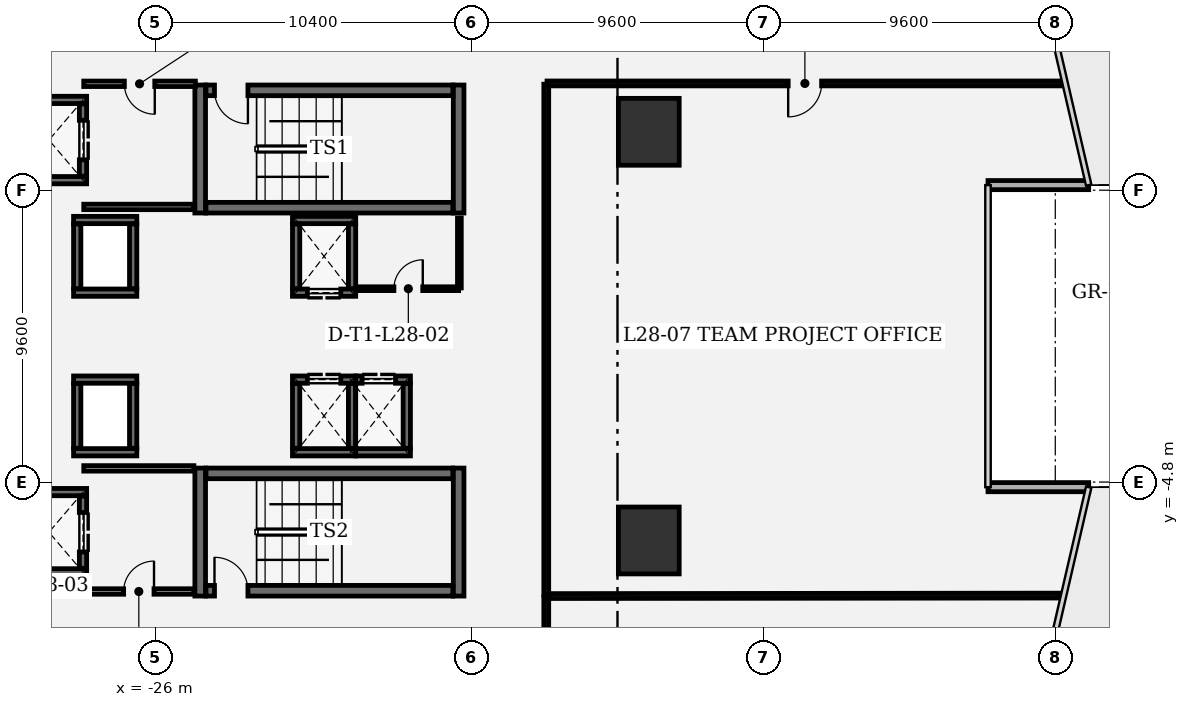
"""IFC4 building model, lengths in metres.
Left out: names, types, materials, properties, quantities, classifications, styles, units other than length and angle.
Written with IfcOpenShell. Run it as: python <this file> out.ifc"""

import sys

from ifc_helpers import new_model, si_unit, direction, frame, frame_2d, origin, origin_2d, place, context, subcontext, project, spatial, rectangle, extrude, element, fill, save


model = new_model("IFC4")
c1 = context("Model", 3, precision=1e-05, world=origin(), true_north=direction((0.0, 1.0)))
c2 = subcontext(c1, "Body", "Model", "MODEL_VIEW")
j1 = project(units=[si_unit("LENGTHUNIT", "METRE"), si_unit("PLANEANGLEUNIT", "RADIAN")], contexts=[c1])
p1 = place(None, origin())
s1 = spatial("IfcSite", under=j1, at=p1, CompositionType="ELEMENT")
p2 = place(p1, origin())
s2 = spatial("IfcBuilding", under=s1, at=p2, CompositionType="ELEMENT")
p3 = place(p2, frame((0.0, 0.0, 126.0)))
s3 = spatial("IfcBuildingStorey", under=s2, at=p3, CompositionType="ELEMENT", Elevation=126.0)
for number, where, z_axis, x_axis in (
    (1, (-9.77, -6.721, 0.0), (0.0, 0.0, 1.0), (1.0, 0.0, 0.0)),
    (2, (-9.77, 6.721, 0.0), (0.0, 0.0, 1.0), (1.0, 0.0, 0.0)),
):
    element("IfcColumn", number, at=place(p3, frame(where, z_axis=z_axis, x_axis=x_axis)), inside=s3, PredefinedType="COLUMN", context=c2, shape_type="SweptSolid", body=[
        extrude(rectangle(XDim=2.0, YDim=2.2, at=origin_2d()), origin(), (0.0, 0.0, 1.0), 4.05),
    ])
for number, where, z_axis, x_axis in (
    (3, (4.699, -4.968, 0.0), (0.0, 0.0, 1.0), (-1.0, 0.0, 0.0)),
    (4, (1.387, 4.968, 0.0), (0.0, 0.0, 1.0), (1.0, 0.0, 0.0)),
):
    element("IfcWall", number, at=place(p3, frame(where, z_axis=z_axis, x_axis=x_axis)), inside=s3, PredefinedType="SOLIDWALL", context=c2, shape_type="SweptSolid", body=[
        extrude(rectangle(XDim=3.312, YDim=0.3, at=frame_2d((1.656, 0.0))), origin(), (0.0, 0.0, 1.0), 3.77),
    ])
for number, where, z_axis, x_axis in (
    (5, (-24.525, 8.26, 0.0), (0.0, 0.0, 1.0), (0.0, -1.0, 0.0)),
    (6, (-16.025, 4.05, 0.0), (0.0, 0.0, 1.0), (0.0, 1.0, 0.0)),
):
    element("IfcWall", number, at=place(p3, frame(where, z_axis=z_axis, x_axis=x_axis)), inside=s3, PredefinedType="SHEAR", context=c2, shape_type="SweptSolid", body=[
        extrude(rectangle(XDim=4.21, YDim=0.35, at=frame_2d((2.105, 0.0))), origin(), (0.0, 0.0, 1.0), 3.77),
    ])
p4 = place(p3, frame((-24.335, 4.225, 0.0), z_axis=(0.0, 0.0, 1.0), x_axis=(1.0, 0.0, 0.0)))
e7 = element("IfcWall", 7, at=p4, inside=s3, PredefinedType="SHEAR", context=c2, shape_type="SweptSolid", body=[
    extrude(rectangle(XDim=8.12, YDim=0.35, at=frame_2d((4.06, 0.0))), origin(), (0.0, 0.0, 1.0), 3.77),
])
p5 = place(p3, frame((-16.215, 8.085, 0.0), z_axis=(0.0, 0.0, 1.0), x_axis=(-1.0, 0.0, 0.0)))
e8 = element("IfcWall", 8, at=p5, inside=s3, PredefinedType="SHEAR", context=c2, shape_type="SweptSolid", body=[
    extrude(rectangle(XDim=8.12, YDim=0.35, at=frame_2d((4.06, 0.0))), origin(), (0.0, 0.0, 1.0), 3.77),
])
p6 = place(p5, frame((6.74, 0.0, 0.0)))
e9 = element("IfcOpeningElement", 9, at=p6, cuts=e8, PredefinedType="OPENING", context=c2, shape_type="SweptSolid", body=[
    extrude(rectangle(XDim=1.1, YDim=2.2, at=frame_2d((0.55, 1.1))), frame((0.0, 0.185, 0.0), z_axis=(0.0, -1.0, 0.0), x_axis=(1.0, 0.0, 0.0)), (0.0, 0.0, 1.0), 0.37),
])
for number, where, z_axis, x_axis in (
    (10, (-24.525, -4.34, 0.0), (0.0, 0.0, 1.0), (0.0, -1.0, 0.0)),
    (11, (-16.025, -8.55, 0.0), (0.0, 0.0, 1.0), (0.0, 1.0, 0.0)),
):
    element("IfcWall", number, at=place(p3, frame(where, z_axis=z_axis, x_axis=x_axis)), inside=s3, PredefinedType="SHEAR", context=c2, shape_type="SweptSolid", body=[
        extrude(rectangle(XDim=4.21, YDim=0.35, at=frame_2d((2.105, 0.0))), origin(), (0.0, 0.0, 1.0), 3.77),
    ])
p7 = place(p3, frame((-24.335, -8.375, 0.0), z_axis=(0.0, 0.0, 1.0), x_axis=(1.0, 0.0, 0.0)))
e12 = element("IfcWall", 12, at=p7, inside=s3, PredefinedType="SHEAR", context=c2, shape_type="SweptSolid", body=[
    extrude(rectangle(XDim=8.12, YDim=0.35, at=frame_2d((4.06, 0.0))), origin(), (0.0, 0.0, 1.0), 3.77),
])
p8 = place(p7, frame((0.28, 0.0, 0.0)))
e13 = element("IfcOpeningElement", 13, at=p8, cuts=e12, PredefinedType="OPENING", context=c2, shape_type="SweptSolid", body=[
    extrude(rectangle(XDim=1.1, YDim=2.2, at=frame_2d((0.55, 1.1))), frame((0.0, 0.185, 0.0), z_axis=(0.0, -1.0, 0.0), x_axis=(1.0, 0.0, 0.0)), (0.0, 0.0, 1.0), 0.37),
])
p9 = place(p3, frame((-16.215, -4.515, 0.0), z_axis=(0.0, 0.0, 1.0), x_axis=(-1.0, 0.0, 0.0)))
e14 = element("IfcWall", 14, at=p9, inside=s3, PredefinedType="SHEAR", context=c2, shape_type="SweptSolid", body=[
    extrude(rectangle(XDim=8.12, YDim=0.35, at=frame_2d((4.06, 0.0))), origin(), (0.0, 0.0, 1.0), 3.77),
])
for number, where, z_axis, x_axis in (
    (15, (-28.26, 5.13, 0.0), (0.0, 0.0, 1.0), (-1.0, 0.0, 0.0)),
    (16, (-30.74, 7.77, 0.0), (0.0, 0.0, 1.0), (1.0, 0.0, 0.0)),
):
    element("IfcWall", number, at=place(p3, frame(where, z_axis=z_axis, x_axis=x_axis)), inside=s3, PredefinedType="SHEAR", context=c2, shape_type="SweptSolid", body=[
        extrude(rectangle(XDim=2.48, YDim=0.24, at=frame_2d((1.24, 0.0))), origin(), (0.0, 0.0, 1.0), 3.77),
    ])
p10 = place(p3, frame((-28.38, 7.638, 0.0), z_axis=(0.0, 0.0, 1.0), x_axis=(0.0, -1.0, 0.0)))
e17 = element("IfcWall", 17, at=p10, inside=s3, PredefinedType="SHEAR", context=c2, shape_type="SweptSolid", body=[
    extrude(rectangle(XDim=2.376, YDim=0.24, at=frame_2d((1.188, 0.0))), origin(), (0.0, 0.0, 1.0), 3.77),
])
p11 = place(p10, frame((0.538, 0.0, 0.0)))
e18 = element("IfcOpeningElement", 18, at=p11, cuts=e17, PredefinedType="OPENING", context=c2, shape_type="SweptSolid", body=[
    extrude(rectangle(XDim=1.3, YDim=2.3, at=frame_2d((0.65, 1.15))), frame((0.0, 0.13, 0.0), z_axis=(0.0, -1.0, 0.0), x_axis=(1.0, 0.0, 0.0)), (0.0, 0.0, 1.0), 0.26),
])
for number, where, z_axis, x_axis in (
    (19, (-28.26, -7.77, 0.0), (0.0, 0.0, 1.0), (-1.0, 0.0, 0.0)),
    (20, (-30.74, -5.13, 0.0), (0.0, 0.0, 1.0), (1.0, 0.0, 0.0)),
):
    element("IfcWall", number, at=place(p3, frame(where, z_axis=z_axis, x_axis=x_axis)), inside=s3, PredefinedType="SHEAR", context=c2, shape_type="SweptSolid", body=[
        extrude(rectangle(XDim=2.48, YDim=0.24, at=frame_2d((1.24, 0.0))), origin(), (0.0, 0.0, 1.0), 3.77),
    ])
p12 = place(p3, frame((-28.38, -5.262, 0.0), z_axis=(0.0, 0.0, 1.0), x_axis=(0.0, -1.0, 0.0)))
e21 = element("IfcWall", 21, at=p12, inside=s3, PredefinedType="SHEAR", context=c2, shape_type="SweptSolid", body=[
    extrude(rectangle(XDim=2.376, YDim=0.24, at=frame_2d((1.188, 0.0))), origin(), (0.0, 0.0, 1.0), 3.77),
])
p13 = place(p12, frame((0.538, 0.0, 0.0)))
e22 = element("IfcOpeningElement", 22, at=p13, cuts=e21, PredefinedType="OPENING", context=c2, shape_type="SweptSolid", body=[
    extrude(rectangle(XDim=1.3, YDim=2.3, at=frame_2d((0.65, 1.15))), frame((0.0, 0.13, 0.0), z_axis=(0.0, -1.0, 0.0), x_axis=(1.0, 0.0, 0.0)), (0.0, 0.0, 1.0), 0.26),
])
for number, where, z_axis, x_axis in (
    (23, (-26.61, 1.43, 0.0), (0.0, 0.0, 1.0), (-1.0, 0.0, 0.0)),
    (24, (-28.69, 3.82, 0.0), (0.0, 0.0, 1.0), (1.0, 0.0, 0.0)),
):
    element("IfcWall", number, at=place(p3, frame(where, z_axis=z_axis, x_axis=x_axis)), inside=s3, PredefinedType="SHEAR", context=c2, shape_type="SweptSolid", body=[
        extrude(rectangle(XDim=2.08, YDim=0.24, at=frame_2d((1.04, 0.0))), origin(), (0.0, 0.0, 1.0), 3.77),
    ])
for number, where, z_axis, x_axis in (
    (25, (-28.57, 1.562, 0.0), (0.0, 0.0, 1.0), (0.0, 1.0, 0.0)),
    (26, (-26.73, 3.688, 0.0), (0.0, 0.0, 1.0), (0.0, -1.0, 0.0)),
):
    element("IfcWall", number, at=place(p3, frame(where, z_axis=z_axis, x_axis=x_axis)), inside=s3, PredefinedType="SHEAR", context=c2, shape_type="SweptSolid", body=[
        extrude(rectangle(XDim=2.126, YDim=0.24, at=frame_2d((1.063, 0.0))), origin(), (0.0, 0.0, 1.0), 3.77),
    ])
p14 = place(p3, frame((-19.41, 1.43, 0.0), z_axis=(0.0, 0.0, 1.0), x_axis=(-1.0, 0.0, 0.0)))
e27 = element("IfcWall", 27, at=p14, inside=s3, PredefinedType="SHEAR", context=c2, shape_type="SweptSolid", body=[
    extrude(rectangle(XDim=2.08, YDim=0.24, at=frame_2d((1.04, 0.0))), origin(), (0.0, 0.0, 1.0), 3.77),
])
p15 = place(p14, frame((0.49, 0.0, 0.0)))
e28 = element("IfcOpeningElement", 28, at=p15, cuts=e27, PredefinedType="OPENING", context=c2, shape_type="SweptSolid", body=[
    extrude(rectangle(XDim=1.1, YDim=2.2, at=frame_2d((0.55, 1.1))), frame((0.0, 0.13, 0.0), z_axis=(0.0, -1.0, 0.0), x_axis=(1.0, 0.0, 0.0)), (0.0, 0.0, 1.0), 0.26),
])
p16 = place(p3, frame((-21.49, 3.82, 0.0), z_axis=(0.0, 0.0, 1.0), x_axis=(1.0, 0.0, 0.0)))
e29 = element("IfcWall", 29, at=p16, inside=s3, PredefinedType="SHEAR", context=c2, shape_type="SweptSolid", body=[
    extrude(rectangle(XDim=2.08, YDim=0.24, at=frame_2d((1.04, 0.0))), origin(), (0.0, 0.0, 1.0), 3.77),
])
for number, where, z_axis, x_axis in (
    (30, (-21.37, 1.562, 0.0), (0.0, 0.0, 1.0), (0.0, 1.0, 0.0)),
    (31, (-19.53, 3.688, 0.0), (0.0, 0.0, 1.0), (0.0, -1.0, 0.0)),
):
    element("IfcWall", number, at=place(p3, frame(where, z_axis=z_axis, x_axis=x_axis)), inside=s3, PredefinedType="SHEAR", context=c2, shape_type="SweptSolid", body=[
        extrude(rectangle(XDim=2.126, YDim=0.24, at=frame_2d((1.063, 0.0))), origin(), (0.0, 0.0, 1.0), 3.77),
    ])
for number, where, z_axis, x_axis in (
    (32, (-26.61, -3.82, 0.0), (0.0, 0.0, 1.0), (-1.0, 0.0, 0.0)),
    (33, (-28.69, -1.43, 0.0), (0.0, 0.0, 1.0), (1.0, 0.0, 0.0)),
):
    element("IfcWall", number, at=place(p3, frame(where, z_axis=z_axis, x_axis=x_axis)), inside=s3, PredefinedType="SHEAR", context=c2, shape_type="SweptSolid", body=[
        extrude(rectangle(XDim=2.08, YDim=0.24, at=frame_2d((1.04, 0.0))), origin(), (0.0, 0.0, 1.0), 3.77),
    ])
for number, where, z_axis, x_axis in (
    (34, (-28.57, -3.688, 0.0), (0.0, 0.0, 1.0), (0.0, 1.0, 0.0)),
    (35, (-26.73, -1.562, 0.0), (0.0, 0.0, 1.0), (0.0, -1.0, 0.0)),
):
    element("IfcWall", number, at=place(p3, frame(where, z_axis=z_axis, x_axis=x_axis)), inside=s3, PredefinedType="SHEAR", context=c2, shape_type="SweptSolid", body=[
        extrude(rectangle(XDim=2.126, YDim=0.24, at=frame_2d((1.063, 0.0))), origin(), (0.0, 0.0, 1.0), 3.77),
    ])
p17 = place(p3, frame((-19.41, -3.82, 0.0), z_axis=(0.0, 0.0, 1.0), x_axis=(-1.0, 0.0, 0.0)))
e36 = element("IfcWall", 36, at=p17, inside=s3, PredefinedType="SHEAR", context=c2, shape_type="SweptSolid", body=[
    extrude(rectangle(XDim=2.08, YDim=0.24, at=frame_2d((1.04, 0.0))), origin(), (0.0, 0.0, 1.0), 3.77),
])
p18 = place(p3, frame((-21.49, -1.43, 0.0), z_axis=(0.0, 0.0, 1.0), x_axis=(1.0, 0.0, 0.0)))
e37 = element("IfcWall", 37, at=p18, inside=s3, PredefinedType="SHEAR", context=c2, shape_type="SweptSolid", body=[
    extrude(rectangle(XDim=2.08, YDim=0.24, at=frame_2d((1.04, 0.0))), origin(), (0.0, 0.0, 1.0), 3.77),
])
p19 = place(p18, frame((0.49, 0.0, 0.0)))
e38 = element("IfcOpeningElement", 38, at=p19, cuts=e37, PredefinedType="OPENING", context=c2, shape_type="SweptSolid", body=[
    extrude(rectangle(XDim=1.1, YDim=2.2, at=frame_2d((0.55, 1.1))), frame((0.0, 0.13, 0.0), z_axis=(0.0, -1.0, 0.0), x_axis=(1.0, 0.0, 0.0)), (0.0, 0.0, 1.0), 0.26),
])
for number, where, z_axis, x_axis in (
    (39, (-21.37, -3.688, 0.0), (0.0, 0.0, 1.0), (0.0, 1.0, 0.0)),
    (40, (-19.53, -1.562, 0.0), (0.0, 0.0, 1.0), (0.0, -1.0, 0.0)),
):
    element("IfcWall", number, at=place(p3, frame(where, z_axis=z_axis, x_axis=x_axis)), inside=s3, PredefinedType="SHEAR", context=c2, shape_type="SweptSolid", body=[
        extrude(rectangle(XDim=2.126, YDim=0.24, at=frame_2d((1.063, 0.0))), origin(), (0.0, 0.0, 1.0), 3.77),
    ])
p20 = place(p3, frame((-17.61, -3.82, 0.0), z_axis=(0.0, 0.0, 1.0), x_axis=(-1.0, 0.0, 0.0)))
e41 = element("IfcWall", 41, at=p20, inside=s3, PredefinedType="SHEAR", context=c2, shape_type="SweptSolid", body=[
    extrude(rectangle(XDim=1.8, YDim=0.24, at=frame_2d((0.9, 0.0))), origin(), (0.0, 0.0, 1.0), 3.77),
])
p21 = place(p3, frame((-19.41, -1.43, 0.0), z_axis=(0.0, 0.0, 1.0), x_axis=(1.0, 0.0, 0.0)))
e42 = element("IfcWall", 42, at=p21, inside=s3, PredefinedType="SHEAR", context=c2, shape_type="SweptSolid", body=[
    extrude(rectangle(XDim=1.8, YDim=0.24, at=frame_2d((0.9, 0.0))), origin(), (0.0, 0.0, 1.0), 3.77),
])
p22 = place(p21, frame((0.21, 0.0, 0.0)))
e43 = element("IfcOpeningElement", 43, at=p22, cuts=e42, PredefinedType="OPENING", context=c2, shape_type="SweptSolid", body=[
    extrude(rectangle(XDim=1.1, YDim=2.2, at=frame_2d((0.55, 1.1))), frame((0.0, 0.13, 0.0), z_axis=(0.0, -1.0, 0.0), x_axis=(1.0, 0.0, 0.0)), (0.0, 0.0, 1.0), 0.26),
])
p23 = place(p3, frame((-17.73, -1.562, 0.0), z_axis=(0.0, 0.0, 1.0), x_axis=(0.0, -1.0, 0.0)))
e44 = element("IfcWall", 44, at=p23, inside=s3, PredefinedType="SHEAR", context=c2, shape_type="SweptSolid", body=[
    extrude(rectangle(XDim=2.126, YDim=0.24, at=frame_2d((1.063, 0.0))), origin(), (0.0, 0.0, 1.0), 3.77),
])
p24 = place(p3, frame((-28.355, 4.25, 0.0), z_axis=(0.0, 0.0, 1.0), x_axis=(1.0, 0.0, 0.0)))
e45 = element("IfcWall", 45, at=p24, inside=s3, PredefinedType="PARTITIONING", context=c2, shape_type="SweptSolid", body=[
    extrude(rectangle(XDim=3.622, YDim=0.18, at=frame_2d((1.811, 0.0))), origin(), (0.0, 0.0, 1.0), 3.77),
])
p25 = place(p3, frame((-24.684, 8.3, 0.0), z_axis=(0.0, 0.0, 1.0), x_axis=(-1.0, 0.0, 0.0)))
e46 = element("IfcWall", 46, at=p25, inside=s3, PredefinedType="PARTITIONING", context=c2, shape_type="SweptSolid", body=[
    extrude(rectangle(XDim=3.671, YDim=0.18, at=frame_2d((1.835, 0.0))), origin(), (0.0, 0.0, 1.0), 3.77),
])
p26 = place(p25, frame((1.335, 0.0, 0.0)))
e47 = element("IfcOpeningElement", 47, at=p26, cuts=e46, PredefinedType="OPENING", context=c2, shape_type="SweptSolid", body=[
    extrude(rectangle(XDim=1.0, YDim=2.15, at=frame_2d((0.5, 1.075))), frame((0.0, 0.1, 0.0), z_axis=(0.0, -1.0, 0.0), x_axis=(1.0, 0.0, 0.0)), (0.0, 0.0, 1.0), 0.2),
])
p27 = place(p3, frame((-28.355, -8.4, 0.0), z_axis=(0.0, 0.0, 1.0), x_axis=(1.0, 0.0, 0.0)))
e48 = element("IfcWall", 48, at=p27, inside=s3, PredefinedType="PARTITIONING", context=c2, shape_type="SweptSolid", body=[
    extrude(rectangle(XDim=3.622, YDim=0.18, at=frame_2d((1.811, 0.0))), origin(), (0.0, 0.0, 1.0), 3.77),
])
p28 = place(p27, frame((1.311, 0.0, 0.0)))
e49 = element("IfcOpeningElement", 49, at=p28, cuts=e48, PredefinedType="OPENING", context=c2, shape_type="SweptSolid", body=[
    extrude(rectangle(XDim=1.0, YDim=2.15, at=frame_2d((0.5, 1.075))), frame((0.0, 0.1, 0.0), z_axis=(0.0, -1.0, 0.0), x_axis=(1.0, 0.0, 0.0)), (0.0, 0.0, 1.0), 0.2),
])
p29 = place(p3, frame((-24.733, -4.35, 0.0), z_axis=(0.0, 0.0, 1.0), x_axis=(-1.0, 0.0, 0.0)))
e50 = element("IfcWall", 50, at=p29, inside=s3, PredefinedType="PARTITIONING", context=c2, shape_type="SweptSolid", body=[
    extrude(rectangle(XDim=3.622, YDim=0.18, at=frame_2d((1.811, 0.0))), origin(), (0.0, 0.0, 1.0), 3.77),
])
p30 = place(p3, frame((-19.334, 1.56, 0.0), z_axis=(0.0, 0.0, 1.0), x_axis=(1.0, 0.0, 0.0)))
e51 = element("IfcWall", 51, at=p30, inside=s3, PredefinedType="PARTITIONING", context=c2, shape_type="SweptSolid", body=[
    extrude(rectangle(XDim=3.309, YDim=0.125, at=frame_2d((1.654, 0.0))), origin(), (0.0, 0.0, 1.0), 3.77),
])
p31 = place(p30, frame((1.179, 0.0, 0.0)))
e52 = element("IfcOpeningElement", 52, at=p31, cuts=e51, PredefinedType="OPENING", context=c2, shape_type="SweptSolid", body=[
    extrude(rectangle(XDim=0.95, YDim=2.15, at=frame_2d((0.475, 1.075))), frame((0.0, 0.073, 0.0), z_axis=(0.0, -1.0, 0.0), x_axis=(1.0, 0.0, 0.0)), (0.0, 0.0, 1.0), 0.145),
])
p32 = place(p3, frame((-16.0, 1.585, 0.0), z_axis=(0.0, 0.0, 1.0), x_axis=(0.0, 1.0, 0.0)))
e53 = element("IfcWall", 53, at=p32, inside=s3, PredefinedType="PARTITIONING", context=c2, shape_type="SweptSolid", body=[
    extrude(rectangle(XDim=2.302, YDim=0.125, at=frame_2d((1.151, 0.0))), origin(), (0.0, 0.0, 1.0), 3.77),
])
p33 = place(p3, frame((3.794, -8.534, 0.0), z_axis=(0.0, 0.0, 1.0), x_axis=(-0.999999573173, -0.000923933833, 0.0)))
e54 = element("IfcWall", 54, at=p33, inside=s3, PredefinedType="PARTITIONING", context=c2, shape_type="SweptSolid", body=[
    extrude(rectangle(XDim=16.911, YDim=0.16, at=frame_2d((8.456, 0.0))), origin(), (0.0, 0.0, 1.0), 2.885),
])
p34 = place(p3, frame((-13.142, -8.575, 0.0), z_axis=(0.0, 0.0, 1.0), x_axis=(0.0, -1.0, 0.0)))
e55 = element("IfcWall", 55, at=p34, inside=s3, PredefinedType="PARTITIONING", context=c2, shape_type="SweptSolid", body=[
    extrude(rectangle(XDim=2.358, YDim=0.16, at=frame_2d((1.179, 0.0))), origin(), (0.0, 0.0, 1.0), 3.77),
])
p35 = place(p3, frame((3.846, 8.312, 0.0), z_axis=(0.0, 0.0, 1.0), x_axis=(-1.0, 0.0, 0.0)))
e56 = element("IfcWall", 56, at=p35, inside=s3, PredefinedType="PARTITIONING", context=c2, shape_type="SweptSolid", body=[
    extrude(rectangle(XDim=16.963, YDim=0.16, at=frame_2d((8.481, 0.0))), origin(), (0.0, 0.0, 1.0), 2.885),
])
p36 = place(p35, frame((7.931, 0.0, 0.0)))
e57 = element("IfcOpeningElement", 57, at=p36, cuts=e56, PredefinedType="OPENING", context=c2, shape_type="SweptSolid", body=[
    extrude(rectangle(XDim=1.1, YDim=2.15, at=frame_2d((0.55, 1.075))), frame((0.0, 0.09, 0.0), z_axis=(0.0, -1.0, 0.0), x_axis=(1.0, 0.0, 0.0)), (0.0, 0.0, 1.0), 0.18),
])
p37 = place(p3, frame((-13.142, 8.287, 0.0), z_axis=(0.0, 0.0, 1.0), x_axis=(0.0, -1.0, 0.0)))
e58 = element("IfcWall", 58, at=p37, inside=s3, PredefinedType="PARTITIONING", context=c2, shape_type="SweptSolid", body=[
    extrude(rectangle(XDim=16.804, YDim=0.16, at=frame_2d((8.402, 0.0))), origin(), (0.0, 0.0, 1.0), 3.77),
])
p38 = place(p6, origin())
e59 = element("IfcDoor", 59, at=p38, inside=s3, OperationType="SINGLE_SWING_LEFT", PredefinedType="DOOR", context=c2, shape_type="SweptSolid", body=[
    extrude(rectangle(XDim=1.1, YDim=2.2, at=frame_2d((0.55, 1.1))), frame((0.0, 0.025, 0.0), z_axis=(0.0, -1.0, 0.0), x_axis=(1.0, 0.0, 0.0)), (0.0, 0.0, 1.0), 0.05),
])
fill(e9, e59)
p39 = place(p8, origin())
e60 = element("IfcDoor", 60, at=p39, inside=s3, OperationType="SINGLE_SWING_LEFT", PredefinedType="DOOR", context=c2, shape_type="SweptSolid", body=[
    extrude(rectangle(XDim=1.1, YDim=2.2, at=frame_2d((0.55, 1.1))), frame((0.0, 0.025, 0.0), z_axis=(0.0, -1.0, 0.0), x_axis=(1.0, 0.0, 0.0)), (0.0, 0.0, 1.0), 0.05),
])
fill(e13, e60)
p40 = place(p11, origin())
e61 = element("IfcDoor", 61, at=p40, inside=s3, OperationType="DOUBLE_DOOR_SLIDING", PredefinedType="DOOR", context=c2, shape_type="SweptSolid", body=[
    extrude(rectangle(XDim=1.3, YDim=2.3, at=frame_2d((0.65, 1.15))), frame((0.0, 0.025, 0.0), z_axis=(0.0, -1.0, 0.0), x_axis=(1.0, 0.0, 0.0)), (0.0, 0.0, 1.0), 0.05),
])
fill(e18, e61)
p41 = place(p13, origin())
e62 = element("IfcDoor", 62, at=p41, inside=s3, OperationType="DOUBLE_DOOR_SLIDING", PredefinedType="DOOR", context=c2, shape_type="SweptSolid", body=[
    extrude(rectangle(XDim=1.3, YDim=2.3, at=frame_2d((0.65, 1.15))), frame((0.0, 0.025, 0.0), z_axis=(0.0, -1.0, 0.0), x_axis=(1.0, 0.0, 0.0)), (0.0, 0.0, 1.0), 0.05),
])
fill(e22, e62)
p42 = place(p15, origin())
e63 = element("IfcDoor", 63, at=p42, inside=s3, OperationType="DOUBLE_DOOR_SLIDING", PredefinedType="DOOR", context=c2, shape_type="SweptSolid", body=[
    extrude(rectangle(XDim=1.1, YDim=2.2, at=frame_2d((0.55, 1.1))), frame((0.0, 0.025, 0.0), z_axis=(0.0, -1.0, 0.0), x_axis=(1.0, 0.0, 0.0)), (0.0, 0.0, 1.0), 0.05),
])
fill(e28, e63)
p43 = place(p19, origin())
e64 = element("IfcDoor", 64, at=p43, inside=s3, OperationType="DOUBLE_DOOR_SLIDING", PredefinedType="DOOR", context=c2, shape_type="SweptSolid", body=[
    extrude(rectangle(XDim=1.1, YDim=2.2, at=frame_2d((0.55, 1.1))), frame((0.0, 0.025, 0.0), z_axis=(0.0, -1.0, 0.0), x_axis=(1.0, 0.0, 0.0)), (0.0, 0.0, 1.0), 0.05),
])
fill(e38, e64)
p44 = place(p22, origin())
e65 = element("IfcDoor", 65, at=p44, inside=s3, OperationType="DOUBLE_DOOR_SLIDING", PredefinedType="DOOR", context=c2, shape_type="SweptSolid", body=[
    extrude(rectangle(XDim=1.1, YDim=2.2, at=frame_2d((0.55, 1.1))), frame((0.0, 0.025, 0.0), z_axis=(0.0, -1.0, 0.0), x_axis=(1.0, 0.0, 0.0)), (0.0, 0.0, 1.0), 0.05),
])
fill(e43, e65)
p45 = place(p31, origin())
e66 = element("IfcDoor", 66, at=p45, inside=s3, OperationType="SINGLE_SWING_RIGHT", PredefinedType="DOOR", context=c2, shape_type="SweptSolid", body=[
    extrude(rectangle(XDim=0.95, YDim=2.15, at=frame_2d((0.475, 1.075))), frame((0.0, 0.025, 0.0), z_axis=(0.0, -1.0, 0.0), x_axis=(1.0, 0.0, 0.0)), (0.0, 0.0, 1.0), 0.05),
])
fill(e52, e66)
p46 = place(p36, origin())
e67 = element("IfcDoor", 67, at=p46, inside=s3, OperationType="SINGLE_SWING_RIGHT", PredefinedType="DOOR", context=c2, shape_type="SweptSolid", body=[
    extrude(rectangle(XDim=1.1, YDim=2.15, at=frame_2d((0.55, 1.075))), frame((0.0, 0.025, 0.0), z_axis=(0.0, -1.0, 0.0), x_axis=(1.0, 0.0, 0.0)), (0.0, 0.0, 1.0), 0.05),
])
fill(e57, e67)
p47 = place(p26, origin())
e68 = element("IfcDoor", 68, at=p47, inside=s3, OperationType="SINGLE_SWING_LEFT", PredefinedType="DOOR", context=c2, shape_type="SweptSolid", body=[
    extrude(rectangle(XDim=1.0, YDim=2.15, at=frame_2d((0.5, 1.075))), frame((0.0, 0.025, 0.0), z_axis=(0.0, -1.0, 0.0), x_axis=(1.0, 0.0, 0.0)), (0.0, 0.0, 1.0), 0.05),
])
fill(e47, e68)
p48 = place(p28, origin())
e69 = element("IfcDoor", 69, at=p48, inside=s3, OperationType="SINGLE_SWING_RIGHT", PredefinedType="DOOR", context=c2, shape_type="SweptSolid", body=[
    extrude(rectangle(XDim=1.0, YDim=2.15, at=frame_2d((0.5, 1.075))), frame((0.0, 0.025, 0.0), z_axis=(0.0, -1.0, 0.0), x_axis=(1.0, 0.0, 0.0)), (0.0, 0.0, 1.0), 0.05),
])
fill(e49, e69)
save(model, sys.argv[1])
